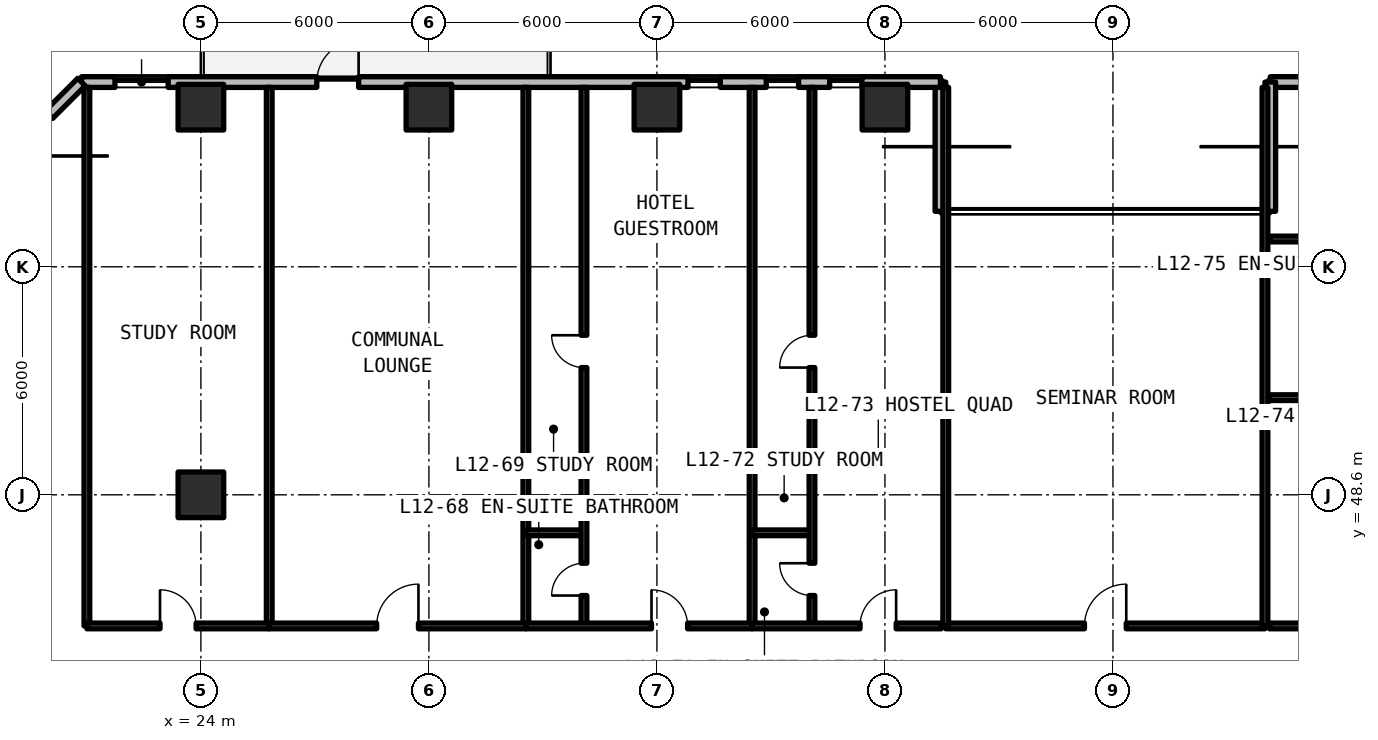
"""IFC4 building model, lengths in metres.
Left out: names, types, materials, properties, quantities, classifications, styles, units other than length and angle.
Written with IfcOpenShell. Run it as: python <this file> out.ifc"""

import sys

from ifc_helpers import new_model, si_unit, direction, frame, frame_2d, origin, origin_2d, place, context, subcontext, project, spatial, rectangle, extrude, element, fill, save


model = new_model("IFC4")
c1 = context("Model", 3, precision=1e-05, world=origin(), true_north=direction((0.0, 1.0)))
c2 = subcontext(c1, "Body", "Model", "MODEL_VIEW")
j1 = project(units=[si_unit("LENGTHUNIT", "METRE"), si_unit("PLANEANGLEUNIT", "RADIAN")], contexts=[c1])
p1 = place(None, origin())
s1 = spatial("IfcSite", under=j1, at=p1, CompositionType="ELEMENT")
p2 = place(p1, origin())
s2 = spatial("IfcBuilding", under=s1, at=p2, CompositionType="ELEMENT")
p3 = place(p2, frame((0.0, 0.0, 45.54)))
s3 = spatial("IfcBuildingStorey", under=s2, at=p3, CompositionType="ELEMENT", Elevation=45.54)
for number, where, z_axis, x_axis in (
    (1, (24.0, 48.6, 0.0), (0.0, 0.0, 1.0), (1.0, 0.0, 0.0)),
    (2, (24.0, 58.8, 0.0), (0.0, 0.0, 1.0), (1.0, 0.0, 0.0)),
    (3, (30.0, 58.8, 0.0), (0.0, 0.0, 1.0), (1.0, 0.0, 0.0)),
    (4, (36.0, 58.8, 0.0), (0.0, 0.0, 1.0), (1.0, 0.0, 0.0)),
    (5, (42.0, 58.8, 0.0), (0.0, 0.0, 1.0), (1.0, 0.0, 0.0)),
):
    element("IfcColumn", number, at=place(p3, frame(where, z_axis=z_axis, x_axis=x_axis)), inside=s3, PredefinedType="COLUMN", context=c2, shape_type="SweptSolid", body=[
        extrude(rectangle(XDim=1.2, YDim=1.2, at=origin_2d()), origin(), (0.0, 0.0, 1.0), 3.3),
    ])
p4 = place(p3, frame((96.542, 59.46, 0.0), z_axis=(0.0, 0.0, 1.0), x_axis=(-1.0, 0.0, 0.0)))
e6 = element("IfcWall", 6, at=p4, inside=s3, PredefinedType="SOLIDWALL", context=c2, shape_type="SweptSolid", body=[
    extrude(rectangle(XDim=44.402, YDim=0.28, at=frame_2d((22.201, 0.0))), origin(), (0.0, 0.0, 1.0), 3.08),
])
p5 = place(p4, frame((32.592, 0.0, 0.0)))
e7 = element("IfcOpeningElement", 7, at=p5, cuts=e6, PredefinedType="OPENING", context=c2, shape_type="SweptSolid", body=[
    extrude(rectangle(XDim=1.1, YDim=2.15, at=frame_2d((0.55, 1.075))), frame((0.0, 0.15, 0.0), z_axis=(0.0, -1.0, 0.0), x_axis=(1.0, 0.0, 0.0)), (0.0, 0.0, 1.0), 0.3),
])
p6 = place(p4, frame((21.742, 0.0, 0.0)))
e8 = element("IfcOpeningElement", 8, at=p6, cuts=e6, PredefinedType="OPENING", context=c2, shape_type="SweptSolid", body=[
    extrude(rectangle(XDim=1.1, YDim=2.15, at=frame_2d((0.55, 1.075))), frame((0.0, 0.15, 0.0), z_axis=(0.0, -1.0, 0.0), x_axis=(1.0, 0.0, 0.0)), (0.0, 0.0, 1.0), 0.3),
])
p7 = place(p4, frame((9.792, 0.0, 0.0)))
e9 = element("IfcOpeningElement", 9, at=p7, cuts=e6, PredefinedType="OPENING", context=c2, shape_type="SweptSolid", body=[
    extrude(rectangle(XDim=1.1, YDim=2.15, at=frame_2d((0.55, 1.075))), frame((0.0, 0.15, 0.0), z_axis=(0.0, -1.0, 0.0), x_axis=(1.0, 0.0, 0.0)), (0.0, 0.0, 1.0), 0.3),
])
p8 = place(p4, frame((39.455, 0.0, 0.78)))
e10 = element("IfcOpeningElement", 10, at=p8, cuts=e6, PredefinedType="OPENING", context=c2, shape_type="SweptSolid", body=[
    extrude(rectangle(XDim=2.2, YDim=1.66, at=frame_2d((1.1, 0.83))), frame((0.0, 0.15, 0.0), z_axis=(0.0, -1.0, 0.0), x_axis=(1.0, 0.0, 0.0)), (0.0, 0.0, 1.0), 0.3),
])
p9 = place(p4, frame((7.432, 0.0, 0.78)))
e11 = element("IfcOpeningElement", 11, at=p9, cuts=e6, PredefinedType="OPENING", context=c2, shape_type="SweptSolid", body=[
    extrude(rectangle(XDim=0.85, YDim=1.65, at=frame_2d((0.425, 0.825))), frame((0.0, 0.15, 0.0), z_axis=(0.0, -1.0, 0.0), x_axis=(1.0, 0.0, 0.0)), (0.0, 0.0, 1.0), 0.3),
])
p10 = place(p4, frame((1.292, 0.0, 0.78)))
e12 = element("IfcOpeningElement", 12, at=p10, cuts=e6, PredefinedType="OPENING", context=c2, shape_type="SweptSolid", body=[
    extrude(rectangle(XDim=2.2, YDim=1.66, at=frame_2d((1.1, 0.83))), frame((0.0, 0.15, 0.0), z_axis=(0.0, -1.0, 0.0), x_axis=(1.0, 0.0, 0.0)), (0.0, 0.0, 1.0), 0.3),
])
for number, where, z_axis, x_axis in (
    (13, (52.14, 59.46, 0.0), (0.0, 0.0, 1.0), (0.0, -1.0, 0.0)),
    (14, (43.46, 56.06, 0.0), (0.0, 0.0, 1.0), (0.0, 1.0, 0.0)),
):
    element("IfcWall", number, at=place(p3, frame(where, z_axis=z_axis, x_axis=x_axis)), inside=s3, PredefinedType="SOLIDWALL", context=c2, shape_type="SweptSolid", body=[
        extrude(rectangle(XDim=3.4, YDim=0.28, at=frame_2d((1.7, 0.0))), origin(), (0.0, 0.0, 1.0), 3.08),
    ])
p11 = place(p3, frame((43.46, 59.46, 0.0), z_axis=(0.0, 0.0, 1.0), x_axis=(-1.0, 0.0, 0.0)))
e15 = element("IfcWall", 15, at=p11, inside=s3, PredefinedType="SOLIDWALL", context=c2, shape_type="SweptSolid", body=[
    extrude(rectangle(XDim=22.602, YDim=0.28, at=frame_2d((11.301, 0.0))), origin(), (0.0, 0.0, 1.0), 3.08),
])
p12 = place(p11, frame((15.31, 0.0, 0.0)))
e16 = element("IfcOpeningElement", 16, at=p12, cuts=e15, PredefinedType="OPENING", context=c2, shape_type="SweptSolid", body=[
    extrude(rectangle(XDim=1.1, YDim=2.15, at=frame_2d((0.55, 1.075))), frame((0.0, 0.15, 0.0), z_axis=(0.0, -1.0, 0.0), x_axis=(1.0, 0.0, 0.0)), (0.0, 0.0, 1.0), 0.3),
])
p13 = place(p11, frame((20.321, 0.0, 0.78)))
e17 = element("IfcOpeningElement", 17, at=p13, cuts=e15, PredefinedType="OPENING", context=c2, shape_type="SweptSolid", body=[
    extrude(rectangle(XDim=1.4, YDim=1.65, at=frame_2d((0.7, 0.825))), frame((0.0, 0.15, 0.0), z_axis=(0.0, -1.0, 0.0), x_axis=(1.0, 0.0, 0.0)), (0.0, 0.0, 1.0), 0.3),
])
p14 = place(p11, frame((5.793, 0.0, 0.78)))
e18 = element("IfcOpeningElement", 18, at=p14, cuts=e15, PredefinedType="OPENING", context=c2, shape_type="SweptSolid", body=[
    extrude(rectangle(XDim=0.85, YDim=1.65, at=frame_2d((0.425, 0.825))), frame((0.0, 0.15, 0.0), z_axis=(0.0, -1.0, 0.0), x_axis=(1.0, 0.0, 0.0)), (0.0, 0.0, 1.0), 0.3),
])
p15 = place(p11, frame((3.733, 0.0, 0.78)))
e19 = element("IfcOpeningElement", 19, at=p15, cuts=e15, PredefinedType="OPENING", context=c2, shape_type="SweptSolid", body=[
    extrude(rectangle(XDim=0.85, YDim=1.65, at=frame_2d((0.425, 0.825))), frame((0.0, 0.15, 0.0), z_axis=(0.0, -1.0, 0.0), x_axis=(1.0, 0.0, 0.0)), (0.0, 0.0, 1.0), 0.3),
])
p16 = place(p11, frame((2.065, 0.0, 0.78)))
e20 = element("IfcOpeningElement", 20, at=p16, cuts=e15, PredefinedType="OPENING", context=c2, shape_type="SweptSolid", body=[
    extrude(rectangle(XDim=0.85, YDim=1.65, at=frame_2d((0.425, 0.825))), frame((0.0, 0.15, 0.0), z_axis=(0.0, -1.0, 0.0), x_axis=(1.0, 0.0, 0.0)), (0.0, 0.0, 1.0), 0.3),
])
p17 = place(p3, frame((20.858, 59.46, 0.0), z_axis=(0.0, 0.0, 1.0), x_axis=(-0.707106781187, -0.707106781187, 0.0)))
e21 = element("IfcWall", 21, at=p17, inside=s3, PredefinedType="SOLIDWALL", context=c2, shape_type="SweptSolid", body=[
    extrude(rectangle(XDim=5.824, YDim=0.28, at=frame_2d((2.912, 0.0))), origin(), (0.0, 0.0, 1.0), 3.08),
])
p18 = place(p17, frame((1.212, 0.0, 0.78)))
e22 = element("IfcOpeningElement", 22, at=p18, cuts=e21, PredefinedType="OPENING", context=c2, shape_type="SweptSolid", body=[
    extrude(rectangle(XDim=3.4, YDim=1.66, at=frame_2d((1.7, 0.83))), frame((0.0, 0.15, 0.0), z_axis=(0.0, -1.0, 0.0), x_axis=(1.0, 0.0, 0.0)), (0.0, 0.0, 1.0), 0.3),
])
p19 = place(p3, frame((43.6, 45.15, 0.0), z_axis=(0.0, 0.0, 1.0), x_axis=(1.0, 0.0, 0.0)))
e23 = element("IfcWall", 23, at=p19, inside=s3, PredefinedType="SOLIDWALL", context=c2, shape_type="SweptSolid", body=[
    extrude(rectangle(XDim=8.4, YDim=0.15, at=frame_2d((4.2, 0.0))), origin(), (0.0, 0.0, 1.0), 2.35),
])
p20 = place(p19, frame((3.65, 0.0, 0.0)))
e24 = element("IfcOpeningElement", 24, at=p20, cuts=e23, PredefinedType="OPENING", context=c2, shape_type="SweptSolid", body=[
    extrude(rectangle(XDim=1.1, YDim=2.15, at=frame_2d((0.55, 1.075))), frame((0.0, 0.085, 0.0), z_axis=(0.0, -1.0, 0.0), x_axis=(1.0, 0.0, 0.0)), (0.0, 0.0, 1.0), 0.17),
])
for number, where, z_axis, x_axis in (
    (25, (43.6, 45.15, 0.0), (0.0, 0.0, 1.0), (0.0, 1.0, 0.0)),
    (26, (52.0, 45.15, 0.0), (0.0, 0.0, 1.0), (0.0, 1.0, 0.0)),
    (27, (21.0, 45.15, 0.0), (0.0, 0.0, 1.0), (0.0, 1.0, 0.0)),
    (28, (25.798, 45.15, 0.0), (0.0, 0.0, 1.0), (0.0, 1.0, 0.0)),
):
    element("IfcWall", number, at=place(p3, frame(where, z_axis=z_axis, x_axis=x_axis)), inside=s3, PredefinedType="SOLIDWALL", context=c2, shape_type="SweptSolid", body=[
        extrude(rectangle(XDim=14.17, YDim=0.15, at=frame_2d((7.085, 0.0))), origin(), (0.0, 0.0, 1.0), 2.35),
    ])
p21 = place(p3, frame((21.0, 45.15, 0.0), z_axis=(0.0, 0.0, 1.0), x_axis=(1.0, 0.0, 0.0)))
e29 = element("IfcWall", 29, at=p21, inside=s3, PredefinedType="SOLIDWALL", context=c2, shape_type="SweptSolid", body=[
    extrude(rectangle(XDim=4.798, YDim=0.15, at=frame_2d((2.399, 0.0))), origin(), (0.0, 0.0, 1.0), 2.35),
])
p22 = place(p21, frame((1.924, 0.0, 0.0)))
e30 = element("IfcOpeningElement", 30, at=p22, cuts=e29, PredefinedType="OPENING", context=c2, shape_type="SweptSolid", body=[
    extrude(rectangle(XDim=0.95, YDim=2.15, at=frame_2d((0.475, 1.075))), frame((0.0, 0.085, 0.0), z_axis=(0.0, -1.0, 0.0), x_axis=(1.0, 0.0, 0.0)), (0.0, 0.0, 1.0), 0.17),
])
p23 = place(p3, frame((32.551, 45.15, 0.0), z_axis=(0.0, 0.0, 1.0), x_axis=(0.0, 1.0, 0.0)))
e31 = element("IfcWall", 31, at=p23, inside=s3, PredefinedType="SOLIDWALL", context=c2, shape_type="SweptSolid", body=[
    extrude(rectangle(XDim=14.17, YDim=0.15, at=frame_2d((7.085, 0.0))), origin(), (0.0, 0.0, 1.0), 2.35),
])
p24 = place(p3, frame((25.798, 45.15, 0.0), z_axis=(0.0, 0.0, 1.0), x_axis=(1.0, 0.0, 0.0)))
e32 = element("IfcWall", 32, at=p24, inside=s3, PredefinedType="SOLIDWALL", context=c2, shape_type="SweptSolid", body=[
    extrude(rectangle(XDim=6.753, YDim=0.15, at=frame_2d((3.376, 0.0))), origin(), (0.0, 0.0, 1.0), 2.35),
])
p25 = place(p24, frame((2.826, 0.0, 0.0)))
e33 = element("IfcOpeningElement", 33, at=p25, cuts=e32, PredefinedType="OPENING", context=c2, shape_type="SweptSolid", body=[
    extrude(rectangle(XDim=1.1, YDim=2.15, at=frame_2d((0.55, 1.075))), frame((0.0, 0.085, 0.0), z_axis=(0.0, -1.0, 0.0), x_axis=(1.0, 0.0, 0.0)), (0.0, 0.0, 1.0), 0.17),
])
p26 = place(p3, frame((38.504, 45.15, 0.0), z_axis=(0.0, 0.0, 1.0), x_axis=(0.0, 1.0, 0.0)))
e34 = element("IfcWall", 34, at=p26, inside=s3, PredefinedType="SOLIDWALL", context=c2, shape_type="SweptSolid", body=[
    extrude(rectangle(XDim=14.17, YDim=0.15, at=frame_2d((7.085, 0.0))), origin(), (0.0, 0.0, 1.0), 2.35),
])
p27 = place(p3, frame((32.551, 47.6, 0.0), z_axis=(0.0, 0.0, 1.0), x_axis=(1.0, 0.0, 0.0)))
e35 = element("IfcWall", 35, at=p27, inside=s3, PredefinedType="PARTITIONING", context=c2, shape_type="SweptSolid", body=[
    extrude(rectangle(XDim=1.529, YDim=0.15, at=frame_2d((0.765, 0.0))), origin(), (0.0, 0.0, 1.0), 2.35),
])
p28 = place(p3, frame((34.08, 45.15, 0.0), z_axis=(0.0, 0.0, 1.0), x_axis=(0.0, 1.0, 0.0)))
e36 = element("IfcWall", 36, at=p28, inside=s3, PredefinedType="PARTITIONING", context=c2, shape_type="SweptSolid", body=[
    extrude(rectangle(XDim=14.17, YDim=0.15, at=frame_2d((7.085, 0.0))), origin(), (0.0, 0.0, 1.0), 2.35),
])
p29 = place(p28, frame((0.8, 0.0, 0.0)))
e37 = element("IfcOpeningElement", 37, at=p29, cuts=e36, PredefinedType="OPENING", context=c2, shape_type="SweptSolid", body=[
    extrude(rectangle(XDim=0.85, YDim=2.1, at=frame_2d((0.425, 1.05))), frame((0.0, 0.085, 0.0), z_axis=(0.0, -1.0, 0.0), x_axis=(1.0, 0.0, 0.0)), (0.0, 0.0, 1.0), 0.17),
])
p30 = place(p28, frame((6.798, 0.0, 0.0)))
e38 = element("IfcOpeningElement", 38, at=p30, cuts=e36, PredefinedType="OPENING", context=c2, shape_type="SweptSolid", body=[
    extrude(rectangle(XDim=0.85, YDim=2.1, at=frame_2d((0.425, 1.05))), frame((0.0, 0.085, 0.0), z_axis=(0.0, -1.0, 0.0), x_axis=(1.0, 0.0, 0.0)), (0.0, 0.0, 1.0), 0.17),
])
p31 = place(p3, frame((32.551, 45.15, 0.0), z_axis=(0.0, 0.0, 1.0), x_axis=(1.0, 0.0, 0.0)))
e39 = element("IfcWall", 39, at=p31, inside=s3, PredefinedType="SOLIDWALL", context=c2, shape_type="SweptSolid", body=[
    extrude(rectangle(XDim=5.953, YDim=0.15, at=frame_2d((2.977, 0.0))), origin(), (0.0, 0.0, 1.0), 2.35),
])
p32 = place(p31, frame((3.306, 0.0, 0.0)))
e40 = element("IfcOpeningElement", 40, at=p32, cuts=e39, PredefinedType="OPENING", context=c2, shape_type="SweptSolid", body=[
    extrude(rectangle(XDim=0.95, YDim=2.15, at=frame_2d((0.475, 1.075))), frame((0.0, 0.085, 0.0), z_axis=(0.0, -1.0, 0.0), x_axis=(1.0, 0.0, 0.0)), (0.0, 0.0, 1.0), 0.17),
])
p33 = place(p3, frame((38.504, 47.6, 0.0), z_axis=(0.0, 0.0, 1.0), x_axis=(1.0, 0.0, 0.0)))
e41 = element("IfcWall", 41, at=p33, inside=s3, PredefinedType="PARTITIONING", context=c2, shape_type="SweptSolid", body=[
    extrude(rectangle(XDim=1.576, YDim=0.15, at=frame_2d((0.788, 0.0))), origin(), (0.0, 0.0, 1.0), 2.35),
])
p34 = place(p3, frame((40.08, 45.15, 0.0), z_axis=(0.0, 0.0, 1.0), x_axis=(0.0, 1.0, 0.0)))
e42 = element("IfcWall", 42, at=p34, inside=s3, PredefinedType="PARTITIONING", context=c2, shape_type="SweptSolid", body=[
    extrude(rectangle(XDim=14.17, YDim=0.15, at=frame_2d((7.085, 0.0))), origin(), (0.0, 0.0, 1.0), 2.35),
])
p35 = place(p34, frame((0.8, 0.0, 0.0)))
e43 = element("IfcOpeningElement", 43, at=p35, cuts=e42, PredefinedType="OPENING", context=c2, shape_type="SweptSolid", body=[
    extrude(rectangle(XDim=0.85, YDim=2.1, at=frame_2d((0.425, 1.05))), frame((0.0, 0.085, 0.0), z_axis=(0.0, -1.0, 0.0), x_axis=(1.0, 0.0, 0.0)), (0.0, 0.0, 1.0), 0.17),
])
p36 = place(p34, frame((6.798, 0.0, 0.0)))
e44 = element("IfcOpeningElement", 44, at=p36, cuts=e42, PredefinedType="OPENING", context=c2, shape_type="SweptSolid", body=[
    extrude(rectangle(XDim=0.85, YDim=2.1, at=frame_2d((0.425, 1.05))), frame((0.0, 0.085, 0.0), z_axis=(0.0, -1.0, 0.0), x_axis=(1.0, 0.0, 0.0)), (0.0, 0.0, 1.0), 0.17),
])
p37 = place(p3, frame((38.504, 45.15, 0.0), z_axis=(0.0, 0.0, 1.0), x_axis=(1.0, 0.0, 0.0)))
e45 = element("IfcWall", 45, at=p37, inside=s3, PredefinedType="SOLIDWALL", context=c2, shape_type="SweptSolid", body=[
    extrude(rectangle(XDim=4.976, YDim=0.15, at=frame_2d((2.488, 0.0))), origin(), (0.0, 0.0, 1.0), 2.35),
])
p38 = place(p37, frame((2.841, 0.0, 0.0)))
e46 = element("IfcOpeningElement", 46, at=p38, cuts=e45, PredefinedType="OPENING", context=c2, shape_type="SweptSolid", body=[
    extrude(rectangle(XDim=0.95, YDim=2.15, at=frame_2d((0.475, 1.075))), frame((0.0, 0.085, 0.0), z_axis=(0.0, -1.0, 0.0), x_axis=(1.0, 0.0, 0.0)), (0.0, 0.0, 1.0), 0.17),
])
p39 = place(p3, frame((52.12, 51.157, 0.0), z_axis=(0.0, 0.0, 1.0), x_axis=(1.0, 0.0, 0.0)))
e47 = element("IfcWall", 47, at=p39, inside=s3, PredefinedType="PARTITIONING", context=c2, shape_type="SweptSolid", body=[
    extrude(rectangle(XDim=3.8, YDim=0.15, at=frame_2d((1.9, 0.0))), origin(), (0.0, 0.0, 1.0), 2.35),
])
p40 = place(p3, frame((52.12, 55.331, 0.0), z_axis=(0.0, 0.0, 1.0), x_axis=(1.0, 0.0, 0.0)))
e48 = element("IfcWall", 48, at=p40, inside=s3, PredefinedType="PARTITIONING", context=c2, shape_type="SweptSolid", body=[
    extrude(rectangle(XDim=14.221, YDim=0.15, at=frame_2d((7.111, 0.0))), origin(), (0.0, 0.0, 1.0), 2.35),
])
p41 = place(p40, frame((5.173, 0.0, 0.0)))
e49 = element("IfcOpeningElement", 49, at=p41, cuts=e48, PredefinedType="OPENING", context=c2, shape_type="SweptSolid", body=[
    extrude(rectangle(XDim=0.85, YDim=2.1, at=frame_2d((0.425, 1.05))), frame((0.0, 0.085, 0.0), z_axis=(0.0, -1.0, 0.0), x_axis=(1.0, 0.0, 0.0)), (0.0, 0.0, 1.0), 0.17),
])
p42 = place(p40, frame((10.383, 0.0, 0.0)))
e50 = element("IfcOpeningElement", 50, at=p42, cuts=e48, PredefinedType="OPENING", context=c2, shape_type="SweptSolid", body=[
    extrude(rectangle(XDim=0.85, YDim=2.1, at=frame_2d((0.425, 1.05))), frame((0.0, 0.085, 0.0), z_axis=(0.0, -1.0, 0.0), x_axis=(1.0, 0.0, 0.0)), (0.0, 0.0, 1.0), 0.17),
])
p43 = place(p3, frame((52.12, 45.15, 0.0), z_axis=(0.0, 0.0, 1.0), x_axis=(1.0, 0.0, 0.0)))
e51 = element("IfcWall", 51, at=p43, inside=s3, PredefinedType="SOLIDWALL", context=c2, shape_type="SweptSolid", body=[
    extrude(rectangle(XDim=14.221, YDim=0.15, at=frame_2d((7.111, 0.0))), origin(), (0.0, 0.0, 1.0), 2.35),
])
p44 = place(p43, frame((5.995, 0.0, 0.0)))
e52 = element("IfcOpeningElement", 52, at=p44, cuts=e51, PredefinedType="OPENING", context=c2, shape_type="SweptSolid", body=[
    extrude(rectangle(XDim=0.95, YDim=2.15, at=frame_2d((0.475, 1.075))), frame((0.0, 0.085, 0.0), z_axis=(0.0, -1.0, 0.0), x_axis=(1.0, 0.0, 0.0)), (0.0, 0.0, 1.0), 0.17),
])
p45 = place(p12, frame((1.1, 0.0, 0.0), z_axis=(0.0, 0.0, 1.0), x_axis=(-1.0, 0.0, 0.0)))
e53 = element("IfcDoor", 53, at=p45, inside=s3, OperationType="SINGLE_SWING_LEFT", PredefinedType="DOOR", context=c2, shape_type="SweptSolid", body=[
    extrude(rectangle(XDim=1.1, YDim=2.15, at=frame_2d((0.55, 1.075))), frame((0.0, 0.025, 0.0), z_axis=(0.0, -1.0, 0.0), x_axis=(1.0, 0.0, 0.0)), (0.0, 0.0, 1.0), 0.05),
])
fill(e16, e53)
p46 = place(p13, origin())
e54 = element("IfcWindow", 54, at=p46, inside=s3, PartitioningType="SINGLE_PANEL", PredefinedType="WINDOW", context=c2, shape_type="SweptSolid", body=[
    extrude(rectangle(XDim=1.4, YDim=1.65, at=frame_2d((0.7, 0.825))), frame((0.0, 0.03, 0.0), z_axis=(0.0, -1.0, 0.0), x_axis=(1.0, 0.0, 0.0)), (0.0, 0.0, 1.0), 0.06),
])
fill(e17, e54)
p47 = place(p14, origin())
e55 = element("IfcWindow", 55, at=p47, inside=s3, PartitioningType="SINGLE_PANEL", PredefinedType="WINDOW", context=c2, shape_type="SweptSolid", body=[
    extrude(rectangle(XDim=0.85, YDim=1.65, at=frame_2d((0.425, 0.825))), frame((0.0, 0.03, 0.0), z_axis=(0.0, -1.0, 0.0), x_axis=(1.0, 0.0, 0.0)), (0.0, 0.0, 1.0), 0.06),
])
fill(e18, e55)
p48 = place(p15, origin())
e56 = element("IfcWindow", 56, at=p48, inside=s3, PartitioningType="SINGLE_PANEL", PredefinedType="WINDOW", context=c2, shape_type="SweptSolid", body=[
    extrude(rectangle(XDim=0.85, YDim=1.65, at=frame_2d((0.425, 0.825))), frame((0.0, 0.03, 0.0), z_axis=(0.0, -1.0, 0.0), x_axis=(1.0, 0.0, 0.0)), (0.0, 0.0, 1.0), 0.06),
])
fill(e19, e56)
p49 = place(p16, origin())
e57 = element("IfcWindow", 57, at=p49, inside=s3, PartitioningType="SINGLE_PANEL", PredefinedType="WINDOW", context=c2, shape_type="SweptSolid", body=[
    extrude(rectangle(XDim=0.85, YDim=1.65, at=frame_2d((0.425, 0.825))), frame((0.0, 0.03, 0.0), z_axis=(0.0, -1.0, 0.0), x_axis=(1.0, 0.0, 0.0)), (0.0, 0.0, 1.0), 0.06),
])
fill(e20, e57)
p50 = place(p20, origin())
e58 = element("IfcDoor", 58, at=p50, inside=s3, OperationType="SINGLE_SWING_RIGHT", PredefinedType="DOOR", context=c2, shape_type="SweptSolid", body=[
    extrude(rectangle(XDim=1.1, YDim=2.15, at=frame_2d((0.55, 1.075))), frame((0.0, 0.025, 0.0), z_axis=(0.0, -1.0, 0.0), x_axis=(1.0, 0.0, 0.0)), (0.0, 0.0, 1.0), 0.05),
])
fill(e24, e58)
p51 = place(p22, origin())
e59 = element("IfcDoor", 59, at=p51, inside=s3, OperationType="SINGLE_SWING_LEFT", PredefinedType="DOOR", context=c2, shape_type="SweptSolid", body=[
    extrude(rectangle(XDim=0.95, YDim=2.15, at=frame_2d((0.475, 1.075))), frame((0.0, 0.025, 0.0), z_axis=(0.0, -1.0, 0.0), x_axis=(1.0, 0.0, 0.0)), (0.0, 0.0, 1.0), 0.05),
])
fill(e30, e59)
p52 = place(p25, origin())
e60 = element("IfcDoor", 60, at=p52, inside=s3, OperationType="SINGLE_SWING_RIGHT", PredefinedType="DOOR", context=c2, shape_type="SweptSolid", body=[
    extrude(rectangle(XDim=1.1, YDim=2.15, at=frame_2d((0.55, 1.075))), frame((0.0, 0.025, 0.0), z_axis=(0.0, -1.0, 0.0), x_axis=(1.0, 0.0, 0.0)), (0.0, 0.0, 1.0), 0.05),
])
fill(e33, e60)
p53 = place(p29, origin())
e61 = element("IfcDoor", 61, at=p53, inside=s3, OperationType="SINGLE_SWING_LEFT", PredefinedType="DOOR", context=c2, shape_type="SweptSolid", body=[
    extrude(rectangle(XDim=0.85, YDim=2.1, at=frame_2d((0.425, 1.05))), frame((0.0, 0.025, 0.0), z_axis=(0.0, -1.0, 0.0), x_axis=(1.0, 0.0, 0.0)), (0.0, 0.0, 1.0), 0.05),
])
fill(e37, e61)
p54 = place(p30, origin())
e62 = element("IfcDoor", 62, at=p54, inside=s3, OperationType="SINGLE_SWING_RIGHT", PredefinedType="DOOR", context=c2, shape_type="SweptSolid", body=[
    extrude(rectangle(XDim=0.85, YDim=2.1, at=frame_2d((0.425, 1.05))), frame((0.0, 0.025, 0.0), z_axis=(0.0, -1.0, 0.0), x_axis=(1.0, 0.0, 0.0)), (0.0, 0.0, 1.0), 0.05),
])
fill(e38, e62)
p55 = place(p32, origin())
e63 = element("IfcDoor", 63, at=p55, inside=s3, OperationType="SINGLE_SWING_LEFT", PredefinedType="DOOR", context=c2, shape_type="SweptSolid", body=[
    extrude(rectangle(XDim=0.95, YDim=2.15, at=frame_2d((0.475, 1.075))), frame((0.0, 0.025, 0.0), z_axis=(0.0, -1.0, 0.0), x_axis=(1.0, 0.0, 0.0)), (0.0, 0.0, 1.0), 0.05),
])
fill(e40, e63)
p56 = place(p35, origin())
e64 = element("IfcDoor", 64, at=p56, inside=s3, OperationType="SINGLE_SWING_RIGHT", PredefinedType="DOOR", context=c2, shape_type="SweptSolid", body=[
    extrude(rectangle(XDim=0.85, YDim=2.1, at=frame_2d((0.425, 1.05))), frame((0.0, 0.025, 0.0), z_axis=(0.0, -1.0, 0.0), x_axis=(1.0, 0.0, 0.0)), (0.0, 0.0, 1.0), 0.05),
])
fill(e43, e64)
p57 = place(p36, origin())
e65 = element("IfcDoor", 65, at=p57, inside=s3, OperationType="SINGLE_SWING_LEFT", PredefinedType="DOOR", context=c2, shape_type="SweptSolid", body=[
    extrude(rectangle(XDim=0.85, YDim=2.1, at=frame_2d((0.425, 1.05))), frame((0.0, 0.025, 0.0), z_axis=(0.0, -1.0, 0.0), x_axis=(1.0, 0.0, 0.0)), (0.0, 0.0, 1.0), 0.05),
])
fill(e44, e65)
p58 = place(p38, origin())
e66 = element("IfcDoor", 66, at=p58, inside=s3, OperationType="SINGLE_SWING_RIGHT", PredefinedType="DOOR", context=c2, shape_type="SweptSolid", body=[
    extrude(rectangle(XDim=0.95, YDim=2.15, at=frame_2d((0.475, 1.075))), frame((0.0, 0.025, 0.0), z_axis=(0.0, -1.0, 0.0), x_axis=(1.0, 0.0, 0.0)), (0.0, 0.0, 1.0), 0.05),
])
fill(e46, e66)
save(model, sys.argv[1])
